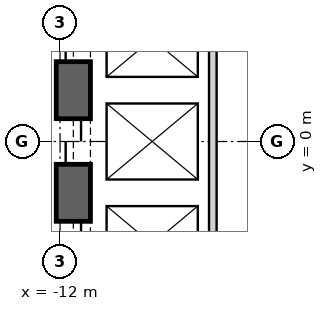
"""IFC4 building model, lengths in metres.
Left out: names, types, materials, properties, quantities, classifications, styles, units other than length and angle.
Written with IfcOpenShell. Run it as: python <this file> out.ifc"""

import sys

from ifc_helpers import new_model, si_unit, direction, frame, frame_2d, origin, place, context, subcontext, project, spatial, rectangle, extrude, element, fill, save


model = new_model("IFC4")
c1 = context("Model", 3, precision=1e-05, world=origin(), true_north=direction((0.0, 1.0)))
c2 = subcontext(c1, "Body", "Model", "MODEL_VIEW")
j1 = project(units=[si_unit("LENGTHUNIT", "METRE"), si_unit("PLANEANGLEUNIT", "RADIAN")], contexts=[c1])
p1 = place(None, origin())
s1 = spatial("IfcSite", under=j1, at=p1, CompositionType="ELEMENT")
p2 = place(p1, origin())
s2 = spatial("IfcBuilding", under=s1, at=p2, CompositionType="ELEMENT")
p3 = place(p2, frame((0.0, 0.0, 57.8)))
s3 = spatial("IfcBuildingStorey", under=s2, at=p3, CompositionType="ELEMENT", Elevation=57.8)
p4 = place(p3, frame((19.475, 2.208, 0.0), z_axis=(0.0, 0.0, 1.0), x_axis=(-0.866028369851, 0.499994862586, 0.0)))
e1 = element("IfcWall", 1, at=p4, inside=s3, PredefinedType="SHEAR", context=c2, shape_type="SweptSolid", body=[
    extrude(rectangle(XDim=31.523, YDim=0.9, at=frame_2d((15.762, 0.0))), origin(), (0.0, 0.0, 1.0), 4.1),
])
p5 = place(p4, frame((7.062, 0.0, 0.0)))
e2 = element("IfcOpeningElement", 2, at=p5, cuts=e1, PredefinedType="OPENING", context=c2, shape_type="SweptSolid", body=[
    extrude(rectangle(XDim=1.2, YDim=2.4, at=frame_2d((0.6, 1.2))), frame((0.0, 0.46, 0.0), z_axis=(0.0, -1.0, 0.0), x_axis=(1.0, 0.0, 0.0)), (0.0, 0.0, 1.0), 0.92),
])
p6 = place(p4, frame((9.762, 0.0, 0.0)))
e3 = element("IfcOpeningElement", 3, at=p6, cuts=e1, PredefinedType="OPENING", context=c2, shape_type="SweptSolid", body=[
    extrude(rectangle(XDim=1.2, YDim=2.4, at=frame_2d((0.6, 1.2))), frame((0.0, 0.46, 0.0), z_axis=(0.0, -1.0, 0.0), x_axis=(1.0, 0.0, 0.0)), (0.0, 0.0, 1.0), 0.92),
])
p7 = place(p4, frame((12.462, 0.0, 0.0)))
e4 = element("IfcOpeningElement", 4, at=p7, cuts=e1, PredefinedType="OPENING", context=c2, shape_type="SweptSolid", body=[
    extrude(rectangle(XDim=1.2, YDim=2.4, at=frame_2d((0.6, 1.2))), frame((0.0, 0.46, 0.0), z_axis=(0.0, -1.0, 0.0), x_axis=(1.0, 0.0, 0.0)), (0.0, 0.0, 1.0), 0.92),
])
p8 = place(p4, frame((15.162, 0.0, 0.0)))
e5 = element("IfcOpeningElement", 5, at=p8, cuts=e1, PredefinedType="OPENING", context=c2, shape_type="SweptSolid", body=[
    extrude(rectangle(XDim=1.2, YDim=2.4, at=frame_2d((0.6, 1.2))), frame((0.0, 0.46, 0.0), z_axis=(0.0, -1.0, 0.0), x_axis=(1.0, 0.0, 0.0)), (0.0, 0.0, 1.0), 0.92),
])
p9 = place(p4, frame((17.862, 0.0, 0.0)))
e6 = element("IfcOpeningElement", 6, at=p9, cuts=e1, PredefinedType="OPENING", context=c2, shape_type="SweptSolid", body=[
    extrude(rectangle(XDim=1.2, YDim=2.4, at=frame_2d((0.6, 1.2))), frame((0.0, 0.46, 0.0), z_axis=(0.0, -1.0, 0.0), x_axis=(1.0, 0.0, 0.0)), (0.0, 0.0, 1.0), 0.92),
])
p10 = place(p4, frame((20.562, 0.0, 0.0)))
e7 = element("IfcOpeningElement", 7, at=p10, cuts=e1, PredefinedType="OPENING", context=c2, shape_type="SweptSolid", body=[
    extrude(rectangle(XDim=1.2, YDim=2.4, at=frame_2d((0.6, 1.2))), frame((0.0, 0.46, 0.0), z_axis=(0.0, -1.0, 0.0), x_axis=(1.0, 0.0, 0.0)), (0.0, 0.0, 1.0), 0.92),
])
p11 = place(p4, frame((23.262, 0.0, 0.0)))
e8 = element("IfcOpeningElement", 8, at=p11, cuts=e1, PredefinedType="OPENING", context=c2, shape_type="SweptSolid", body=[
    extrude(rectangle(XDim=1.2, YDim=2.4, at=frame_2d((0.6, 1.2))), frame((0.0, 0.46, 0.0), z_axis=(0.0, -1.0, 0.0), x_axis=(1.0, 0.0, 0.0)), (0.0, 0.0, 1.0), 0.92),
])
p12 = place(p4, frame((3.612, 0.0, 0.0)))
e9 = element("IfcOpeningElement", 9, at=p12, cuts=e1, PredefinedType="OPENING", context=c2, shape_type="SweptSolid", body=[
    extrude(rectangle(XDim=1.2, YDim=2.4, at=frame_2d((0.6, 1.2))), frame((0.0, 0.46, 0.0), z_axis=(0.0, -1.0, 0.0), x_axis=(1.0, 0.0, 0.0)), (0.0, 0.0, 1.0), 0.92),
])
p13 = place(p4, frame((26.712, 0.0, 0.0)))
e10 = element("IfcOpeningElement", 10, at=p13, cuts=e1, PredefinedType="OPENING", context=c2, shape_type="SweptSolid", body=[
    extrude(rectangle(XDim=1.2, YDim=2.4, at=frame_2d((0.6, 1.2))), frame((0.0, 0.46, 0.0), z_axis=(0.0, -1.0, 0.0), x_axis=(1.0, 0.0, 0.0)), (0.0, 0.0, 1.0), 0.92),
])
p14 = place(p3, frame((-11.65, 15.762, 0.0), z_axis=(0.0, 0.0, 1.0), x_axis=(0.0, -1.0, 0.0)))
e11 = element("IfcWall", 11, at=p14, inside=s3, PredefinedType="SHEAR", context=c2, shape_type="SweptSolid", body=[
    extrude(rectangle(XDim=31.523, YDim=0.9, at=frame_2d((15.762, 0.0))), origin(), (0.0, 0.0, 1.0), 4.1),
])
p15 = place(p14, frame((7.062, 0.0, 0.0)))
e12 = element("IfcOpeningElement", 12, at=p15, cuts=e11, PredefinedType="OPENING", context=c2, shape_type="SweptSolid", body=[
    extrude(rectangle(XDim=1.2, YDim=2.4, at=frame_2d((0.6, 1.2))), frame((0.0, 0.46, 0.0), z_axis=(0.0, -1.0, 0.0), x_axis=(1.0, 0.0, 0.0)), (0.0, 0.0, 1.0), 0.92),
])
p16 = place(p14, frame((9.762, 0.0, 0.0)))
e13 = element("IfcOpeningElement", 13, at=p16, cuts=e11, PredefinedType="OPENING", context=c2, shape_type="SweptSolid", body=[
    extrude(rectangle(XDim=1.2, YDim=2.4, at=frame_2d((0.6, 1.2))), frame((0.0, 0.46, 0.0), z_axis=(0.0, -1.0, 0.0), x_axis=(1.0, 0.0, 0.0)), (0.0, 0.0, 1.0), 0.92),
])
p17 = place(p14, frame((12.462, 0.0, 0.0)))
e14 = element("IfcOpeningElement", 14, at=p17, cuts=e11, PredefinedType="OPENING", context=c2, shape_type="SweptSolid", body=[
    extrude(rectangle(XDim=1.2, YDim=2.4, at=frame_2d((0.6, 1.2))), frame((0.0, 0.46, 0.0), z_axis=(0.0, -1.0, 0.0), x_axis=(1.0, 0.0, 0.0)), (0.0, 0.0, 1.0), 0.92),
])
p18 = place(p14, frame((15.162, 0.0, 0.0)))
e15 = element("IfcOpeningElement", 15, at=p18, cuts=e11, PredefinedType="OPENING", context=c2, shape_type="SweptSolid", body=[
    extrude(rectangle(XDim=1.2, YDim=2.4, at=frame_2d((0.6, 1.2))), frame((0.0, 0.46, 0.0), z_axis=(0.0, -1.0, 0.0), x_axis=(1.0, 0.0, 0.0)), (0.0, 0.0, 1.0), 0.92),
])
p19 = place(p14, frame((17.862, 0.0, 0.0)))
e16 = element("IfcOpeningElement", 16, at=p19, cuts=e11, PredefinedType="OPENING", context=c2, shape_type="SweptSolid", body=[
    extrude(rectangle(XDim=1.2, YDim=2.4, at=frame_2d((0.6, 1.2))), frame((0.0, 0.46, 0.0), z_axis=(0.0, -1.0, 0.0), x_axis=(1.0, 0.0, 0.0)), (0.0, 0.0, 1.0), 0.92),
])
p20 = place(p14, frame((20.562, 0.0, 0.0)))
e17 = element("IfcOpeningElement", 17, at=p20, cuts=e11, PredefinedType="OPENING", context=c2, shape_type="SweptSolid", body=[
    extrude(rectangle(XDim=1.2, YDim=2.4, at=frame_2d((0.6, 1.2))), frame((0.0, 0.46, 0.0), z_axis=(0.0, -1.0, 0.0), x_axis=(1.0, 0.0, 0.0)), (0.0, 0.0, 1.0), 0.92),
])
p21 = place(p14, frame((23.262, 0.0, 0.0)))
e18 = element("IfcOpeningElement", 18, at=p21, cuts=e11, PredefinedType="OPENING", context=c2, shape_type="SweptSolid", body=[
    extrude(rectangle(XDim=1.2, YDim=2.4, at=frame_2d((0.6, 1.2))), frame((0.0, 0.46, 0.0), z_axis=(0.0, -1.0, 0.0), x_axis=(1.0, 0.0, 0.0)), (0.0, 0.0, 1.0), 0.92),
])
p22 = place(p14, frame((3.612, 0.0, 0.0)))
e19 = element("IfcOpeningElement", 19, at=p22, cuts=e11, PredefinedType="OPENING", context=c2, shape_type="SweptSolid", body=[
    extrude(rectangle(XDim=1.2, YDim=2.4, at=frame_2d((0.6, 1.2))), frame((0.0, 0.46, 0.0), z_axis=(0.0, -1.0, 0.0), x_axis=(1.0, 0.0, 0.0)), (0.0, 0.0, 1.0), 0.92),
])
p23 = place(p14, frame((26.712, 0.0, 0.0)))
e20 = element("IfcOpeningElement", 20, at=p23, cuts=e11, PredefinedType="OPENING", context=c2, shape_type="SweptSolid", body=[
    extrude(rectangle(XDim=1.2, YDim=2.4, at=frame_2d((0.6, 1.2))), frame((0.0, 0.46, 0.0), z_axis=(0.0, -1.0, 0.0), x_axis=(1.0, 0.0, 0.0)), (0.0, 0.0, 1.0), 0.92),
])
p24 = place(p3, frame((-7.825, -17.97, 0.0), z_axis=(0.0, 0.0, 1.0), x_axis=(0.866028369851, 0.499994862586, 0.0)))
e21 = element("IfcWall", 21, at=p24, inside=s3, PredefinedType="SHEAR", context=c2, shape_type="SweptSolid", body=[
    extrude(rectangle(XDim=31.523, YDim=0.9, at=frame_2d((15.762, 0.0))), origin(), (0.0, 0.0, 1.0), 4.1),
])
p25 = place(p24, frame((7.062, 0.0, 0.0)))
e22 = element("IfcOpeningElement", 22, at=p25, cuts=e21, PredefinedType="OPENING", context=c2, shape_type="SweptSolid", body=[
    extrude(rectangle(XDim=1.2, YDim=2.4, at=frame_2d((0.6, 1.2))), frame((0.0, 0.46, 0.0), z_axis=(0.0, -1.0, 0.0), x_axis=(1.0, 0.0, 0.0)), (0.0, 0.0, 1.0), 0.92),
])
p26 = place(p24, frame((9.762, 0.0, 0.0)))
e23 = element("IfcOpeningElement", 23, at=p26, cuts=e21, PredefinedType="OPENING", context=c2, shape_type="SweptSolid", body=[
    extrude(rectangle(XDim=1.2, YDim=2.4, at=frame_2d((0.6, 1.2))), frame((0.0, 0.46, 0.0), z_axis=(0.0, -1.0, 0.0), x_axis=(1.0, 0.0, 0.0)), (0.0, 0.0, 1.0), 0.92),
])
p27 = place(p24, frame((12.462, 0.0, 0.0)))
e24 = element("IfcOpeningElement", 24, at=p27, cuts=e21, PredefinedType="OPENING", context=c2, shape_type="SweptSolid", body=[
    extrude(rectangle(XDim=1.2, YDim=2.4, at=frame_2d((0.6, 1.2))), frame((0.0, 0.46, 0.0), z_axis=(0.0, -1.0, 0.0), x_axis=(1.0, 0.0, 0.0)), (0.0, 0.0, 1.0), 0.92),
])
p28 = place(p24, frame((15.162, 0.0, 0.0)))
e25 = element("IfcOpeningElement", 25, at=p28, cuts=e21, PredefinedType="OPENING", context=c2, shape_type="SweptSolid", body=[
    extrude(rectangle(XDim=1.2, YDim=2.4, at=frame_2d((0.6, 1.2))), frame((0.0, 0.46, 0.0), z_axis=(0.0, -1.0, 0.0), x_axis=(1.0, 0.0, 0.0)), (0.0, 0.0, 1.0), 0.92),
])
p29 = place(p24, frame((17.862, 0.0, 0.0)))
e26 = element("IfcOpeningElement", 26, at=p29, cuts=e21, PredefinedType="OPENING", context=c2, shape_type="SweptSolid", body=[
    extrude(rectangle(XDim=1.2, YDim=2.4, at=frame_2d((0.6, 1.2))), frame((0.0, 0.46, 0.0), z_axis=(0.0, -1.0, 0.0), x_axis=(1.0, 0.0, 0.0)), (0.0, 0.0, 1.0), 0.92),
])
p30 = place(p24, frame((20.562, 0.0, 0.0)))
e27 = element("IfcOpeningElement", 27, at=p30, cuts=e21, PredefinedType="OPENING", context=c2, shape_type="SweptSolid", body=[
    extrude(rectangle(XDim=1.2, YDim=2.4, at=frame_2d((0.6, 1.2))), frame((0.0, 0.46, 0.0), z_axis=(0.0, -1.0, 0.0), x_axis=(1.0, 0.0, 0.0)), (0.0, 0.0, 1.0), 0.92),
])
p31 = place(p24, frame((26.712, 0.0, 0.0)))
e28 = element("IfcOpeningElement", 28, at=p31, cuts=e21, PredefinedType="OPENING", context=c2, shape_type="SweptSolid", body=[
    extrude(rectangle(XDim=1.2, YDim=2.4, at=frame_2d((0.6, 1.2))), frame((0.0, 0.46, 0.0), z_axis=(0.0, -1.0, 0.0), x_axis=(1.0, 0.0, 0.0)), (0.0, 0.0, 1.0), 0.92),
])
p32 = place(p24, frame((3.612, 0.0, 0.0)))
e29 = element("IfcOpeningElement", 29, at=p32, cuts=e21, PredefinedType="OPENING", context=c2, shape_type="SweptSolid", body=[
    extrude(rectangle(XDim=1.2, YDim=2.4, at=frame_2d((0.6, 1.2))), frame((0.0, 0.46, 0.0), z_axis=(0.0, -1.0, 0.0), x_axis=(1.0, 0.0, 0.0)), (0.0, 0.0, 1.0), 0.92),
])
p33 = place(p3, frame((-7.98, 4.05, 0.0), z_axis=(0.0, 0.0, 1.0), x_axis=(0.0, -1.0, 0.0)))
e30 = element("IfcWall", 30, at=p33, inside=s3, PredefinedType="PLUMBINGWALL", context=c2, shape_type="SweptSolid", body=[
    extrude(rectangle(XDim=8.1, YDim=0.2, at=frame_2d((4.05, 0.0))), origin(), (0.0, 0.0, 1.0), 3.8),
])
p34 = place(p17, origin())
e31 = element("IfcDoor", 31, at=p34, inside=s3, OperationType="SLIDING_TO_LEFT", PredefinedType="USERDEFINED", context=c2, shape_type="SweptSolid", body=[
    extrude(rectangle(XDim=1.2, YDim=2.4, at=frame_2d((0.6, 1.2))), frame((0.0, 0.025, 0.0), z_axis=(0.0, -1.0, 0.0), x_axis=(1.0, 0.0, 0.0)), (0.0, 0.0, 1.0), 0.05),
])
fill(e14, e31)
p35 = place(p18, origin())
e32 = element("IfcDoor", 32, at=p35, inside=s3, OperationType="SLIDING_TO_LEFT", PredefinedType="USERDEFINED", context=c2, shape_type="SweptSolid", body=[
    extrude(rectangle(XDim=1.2, YDim=2.4, at=frame_2d((0.6, 1.2))), frame((0.0, 0.025, 0.0), z_axis=(0.0, -1.0, 0.0), x_axis=(1.0, 0.0, 0.0)), (0.0, 0.0, 1.0), 0.05),
])
fill(e15, e32)
p36 = place(p19, origin())
e33 = element("IfcDoor", 33, at=p36, inside=s3, OperationType="SLIDING_TO_LEFT", PredefinedType="USERDEFINED", context=c2, shape_type="SweptSolid", body=[
    extrude(rectangle(XDim=1.2, YDim=2.4, at=frame_2d((0.6, 1.2))), frame((0.0, 0.025, 0.0), z_axis=(0.0, -1.0, 0.0), x_axis=(1.0, 0.0, 0.0)), (0.0, 0.0, 1.0), 0.05),
])
fill(e16, e33)
save(model, sys.argv[1])
